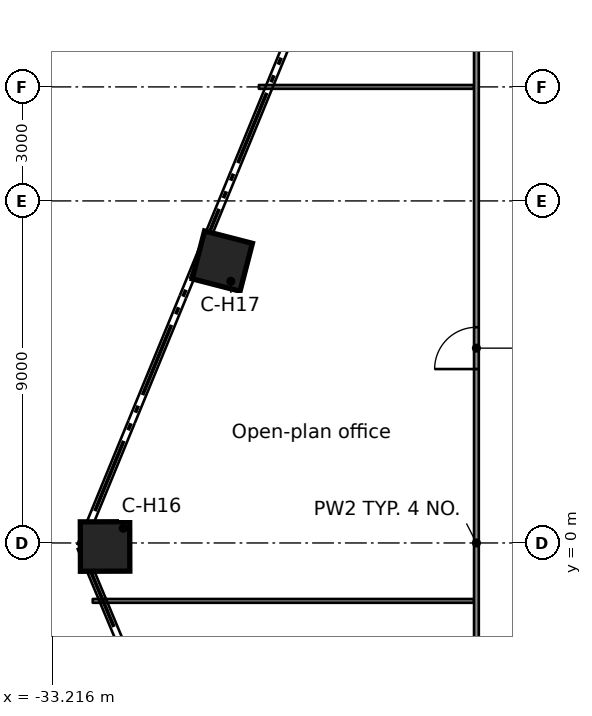
"""IFC4 building model, lengths in metres.
Left out: names, types, materials, properties, quantities, classifications, styles, units other than length and angle.
Written with IfcOpenShell. Run it as: python <this file> out.ifc"""

import sys

from ifc_helpers import new_model, si_unit, direction, frame, frame_2d, origin, origin_2d, place, context, subcontext, project, spatial, rectangle, extrude, element, fill, save


model = new_model("IFC4")
c1 = context("Model", 3, precision=1e-05, world=origin(), true_north=direction((0.0, 1.0)))
c2 = subcontext(c1, "Body", "Model", "MODEL_VIEW")
j1 = project(units=[si_unit("LENGTHUNIT", "METRE"), si_unit("PLANEANGLEUNIT", "RADIAN")], contexts=[c1])
p1 = place(None, origin())
s1 = spatial("IfcSite", under=j1, at=p1, CompositionType="ELEMENT")
p2 = place(p1, origin())
s2 = spatial("IfcBuilding", under=s1, at=p2, CompositionType="ELEMENT")
p3 = place(p2, frame((0.0, 0.0, 105.7)))
s3 = spatial("IfcBuildingStorey", under=s2, at=p3, CompositionType="ELEMENT", Elevation=105.7)
for number, where, z_axis, x_axis in (
    (1, (-31.822, -0.093, 0.0), (0.0, 0.0, 1.0), (-1.0, -0.003, 0.0)),
    (2, (-28.737, 7.417, 0.0), (0.0, 0.0, 1.0), (-0.968, 0.25, 0.0)),
):
    element("IfcColumn", number, at=place(p3, frame(where, z_axis=z_axis, x_axis=x_axis)), inside=s3, PredefinedType="COLUMN", context=c2, shape_type="SweptSolid", body=[
        extrude(rectangle(XDim=1.3, YDim=1.3, at=origin_2d()), origin(), (0.0, 0.0, 1.0), 3.5),
    ])
p4 = place(p3, frame((-32.146, -1.524, 0.0), z_axis=(0.0, 0.0, 1.0), x_axis=(1.0, 0.0, 0.0)))
e3 = element("IfcWall", 3, at=p4, inside=s3, PredefinedType="PARTITIONING", context=c2, shape_type="SweptSolid", body=[
    extrude(rectangle(XDim=10.033, YDim=0.1, at=frame_2d((5.017, 0.0))), origin(), (0.0, 0.0, 1.0), 3.08),
])
p5 = place(p3, frame((-27.774, 12.0, 0.0), z_axis=(0.0, 0.0, 1.0), x_axis=(1.0, 0.0, 0.0)))
e4 = element("IfcWall", 4, at=p5, inside=s3, PredefinedType="PARTITIONING", context=c2, shape_type="SweptSolid", body=[
    extrude(rectangle(XDim=5.661, YDim=0.1, at=frame_2d((2.831, 0.0))), origin(), (0.0, 0.0, 1.0), 3.08),
])
p6 = place(p3, frame((-22.05, -15.051, 0.0), z_axis=(0.0, 0.0, 1.0), x_axis=(0.0, 1.0, 0.0)))
e5 = element("IfcWall", 5, at=p6, inside=s3, PredefinedType="PARTITIONING", context=c2, shape_type="SweptSolid", body=[
    extrude(rectangle(XDim=30.102, YDim=0.125, at=frame_2d((15.051, 0.0))), origin(), (0.0, 0.0, 1.0), 3.08),
])
p7 = place(p6, frame((6.35, 0.0, 0.0)))
e6 = element("IfcOpeningElement", 6, at=p7, cuts=e5, PredefinedType="OPENING", context=c2, shape_type="SweptSolid", body=[
    extrude(rectangle(XDim=0.9, YDim=2.1, at=frame_2d((0.45, 1.05))), frame((0.0, 0.073, 0.0), z_axis=(0.0, -1.0, 0.0), x_axis=(1.0, 0.0, 0.0)), (0.0, 0.0, 1.0), 0.145),
])
p8 = place(p6, frame((19.627, 0.0, 0.0)))
e7 = element("IfcOpeningElement", 7, at=p8, cuts=e5, PredefinedType="OPENING", context=c2, shape_type="SweptSolid", body=[
    extrude(rectangle(XDim=1.1, YDim=2.1, at=frame_2d((0.55, 1.05))), frame((0.0, 0.073, 0.0), z_axis=(0.0, -1.0, 0.0), x_axis=(1.0, 0.0, 0.0)), (0.0, 0.0, 1.0), 0.145),
])
p9 = place(p8, origin())
e8 = element("IfcDoor", 8, at=p9, inside=s3, OperationType="SINGLE_SWING_RIGHT", PredefinedType="DOOR", context=c2, shape_type="SweptSolid", body=[
    extrude(rectangle(XDim=1.1, YDim=2.1, at=frame_2d((0.55, 1.05))), frame((0.0, 0.025, 0.0), z_axis=(0.0, -1.0, 0.0), x_axis=(1.0, 0.0, 0.0)), (0.0, 0.0, 1.0), 0.05),
])
fill(e7, e8)
save(model, sys.argv[1])
